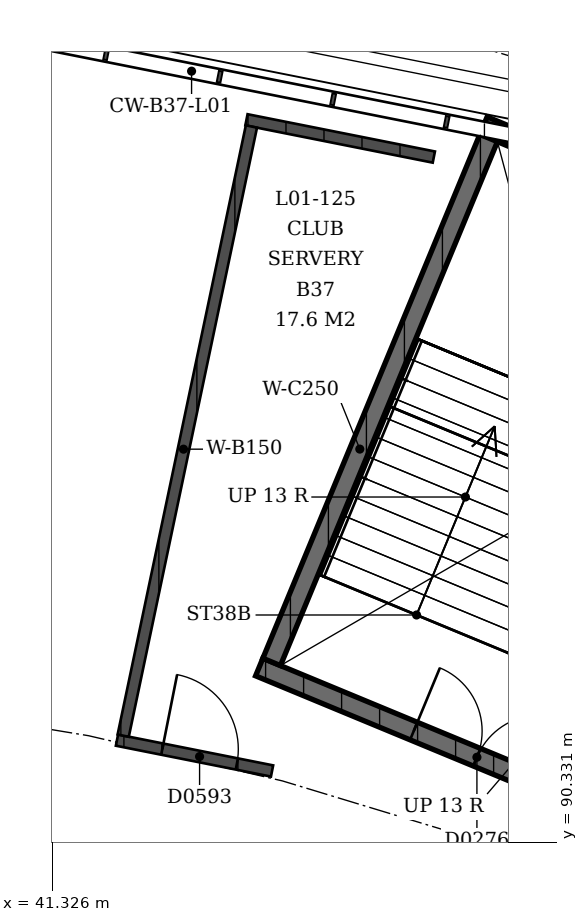
"""IFC4 building model, lengths in metres.
Left out: names, types, materials, properties, quantities, classifications, styles, units other than length and angle.
Written with IfcOpenShell. Run it as: python <this file> out.ifc"""

import sys

from ifc_helpers import new_model, si_unit, direction, frame, frame_2d, origin, place, context, subcontext, project, spatial, rectangle, extrude, element, fill, save


model = new_model("IFC4")
c1 = context("Model", 3, precision=1e-05, world=origin(), true_north=direction((0.0, 1.0)))
c2 = subcontext(c1, "Body", "Model", "MODEL_VIEW")
j1 = project(units=[si_unit("LENGTHUNIT", "METRE"), si_unit("PLANEANGLEUNIT", "RADIAN")], contexts=[c1])
p1 = place(None, origin())
s1 = spatial("IfcSite", under=j1, at=p1, CompositionType="ELEMENT")
p2 = place(p1, origin())
s2 = spatial("IfcBuilding", under=s1, at=p2, CompositionType="ELEMENT")
p3 = place(p2, frame((0.0, 0.0, 4.5)))
s3 = spatial("IfcBuildingStorey", under=s2, at=p3, CompositionType="ELEMENT", Elevation=4.5)
p4 = place(p3, frame((55.274, 87.985, 0.0), z_axis=(0.0, 0.0, 1.0), x_axis=(-0.923877480578, 0.382688386133, 0.0)))
e1 = element("IfcWall", 1, at=p4, inside=s3, PredefinedType="SHEAR", context=c2, shape_type="SweptSolid", body=[
    extrude(rectangle(XDim=12.15, YDim=0.25, at=frame_2d((6.075, 0.0))), origin(), (0.0, 0.0, 1.0), 4.09),
])
p5 = place(p4, frame((2.2, 0.0, 0.0)))
e2 = element("IfcOpeningElement", 2, at=p5, cuts=e1, PredefinedType="OPENING", context=c2, shape_type="SweptSolid", body=[
    extrude(rectangle(XDim=1.8, YDim=2.1, at=frame_2d((0.9, 1.05))), frame((0.0, 0.125, 0.0), z_axis=(0.0, -1.0, 0.0), x_axis=(1.0, 0.0, 0.0)), (0.0, 0.0, 1.0), 0.25),
])
p6 = place(p4, frame((8.15, 0.0, 0.0)))
e3 = element("IfcOpeningElement", 3, at=p6, cuts=e1, PredefinedType="OPENING", context=c2, shape_type="SweptSolid", body=[
    extrude(rectangle(XDim=1.8, YDim=2.1, at=frame_2d((0.9, 1.05))), frame((0.0, 0.125, 0.0), z_axis=(0.0, -1.0, 0.0), x_axis=(1.0, 0.0, 0.0)), (0.0, 0.0, 1.0), 0.25),
])
p7 = place(p3, frame((58.224, 95.108, 0.0), z_axis=(0.0, 0.0, 1.0), x_axis=(-0.923884584817, 0.382671234792, 0.0)))
e4 = element("IfcWall", 4, at=p7, inside=s3, PredefinedType="SHEAR", context=c2, shape_type="SweptSolid", body=[
    extrude(rectangle(XDim=12.15, YDim=0.25, at=frame_2d((6.075, 0.0))), origin(), (0.0, 0.0, 1.0), 4.09),
])
p8 = place(p3, frame((44.212, 92.702, 0.0), z_axis=(0.0, 0.0, 1.0), x_axis=(0.382664910245, 0.923887204407, 0.0)))
e5 = element("IfcWall", 5, at=p8, inside=s3, PredefinedType="SHEAR", context=c2, shape_type="SweptSolid", body=[
    extrude(rectangle(XDim=7.46, YDim=0.25, at=frame_2d((3.73, 0.0))), origin(), (0.0, 0.0, 1.0), 4.09),
])
p9 = place(p3, frame((44.217, 91.268, 0.0), z_axis=(0.0, 0.0, 1.0), x_axis=(-0.980769797582, 0.195168143279, 0.0)))
e6 = element("IfcWall", 6, at=p9, inside=s3, PredefinedType="SOLIDWALL", context=c2, shape_type="SweptSolid", body=[
    extrude(rectangle(XDim=2.08, YDim=0.15, at=frame_2d((1.04, 0.0))), origin(), (0.0, 0.0, 1.0), 3.0),
])
p10 = place(p9, frame((0.472, 0.0, 0.0)))
e7 = element("IfcOpeningElement", 7, at=p10, cuts=e6, PredefinedType="OPENING", context=c2, shape_type="SweptSolid", body=[
    extrude(rectangle(XDim=1.0, YDim=2.1, at=frame_2d((0.5, 1.05))), frame((0.0, 0.075, 0.0), z_axis=(0.0, -1.0, 0.0), x_axis=(1.0, 0.0, 0.0)), (0.0, 0.0, 1.0), 0.15),
])
p11 = place(p3, frame((46.346, 99.344, 0.0), z_axis=(0.0, 0.0, 1.0), x_axis=(-0.980778163577, 0.195126097309, 0.0)))
e8 = element("IfcWall", 8, at=p11, inside=s3, PredefinedType="SOLIDWALL", context=c2, shape_type="SweptSolid", body=[
    extrude(rectangle(XDim=2.514, YDim=0.15, at=frame_2d((1.257, 0.0))), origin(), (0.0, 0.0, 1.0), 3.0),
])
p12 = place(p3, frame((42.259, 91.732, 0.0), z_axis=(0.0, 0.0, 1.0), x_axis=(0.206011983374, 0.978549468707, 0.0)))
e9 = element("IfcWall", 9, at=p12, inside=s3, PredefinedType="SOLIDWALL", context=c2, shape_type="SweptSolid", body=[
    extrude(rectangle(XDim=8.19, YDim=0.15, at=frame_2d((4.095, 0.0))), origin(), (0.0, 0.0, 1.0), 3.0),
])
p13 = place(p6, origin())
e10 = element("IfcDoor", 10, at=p13, inside=s3, OperationType="DOUBLE_DOOR_SINGLE_SWING", PredefinedType="DOOR", context=c2, shape_type="SweptSolid", body=[
    extrude(rectangle(XDim=1.8, YDim=2.1, at=frame_2d((0.9, 1.05))), frame((0.0, 0.025, 0.0), z_axis=(0.0, -1.0, 0.0), x_axis=(1.0, 0.0, 0.0)), (0.0, 0.0, 1.0), 0.05),
])
fill(e3, e10)
p14 = place(p10, origin())
e11 = element("IfcDoor", 11, at=p14, inside=s3, OperationType="SINGLE_SWING_RIGHT", PredefinedType="DOOR", context=c2, shape_type="SweptSolid", body=[
    extrude(rectangle(XDim=1.0, YDim=2.1, at=frame_2d((0.5, 1.05))), frame((0.0, 0.025, 0.0), z_axis=(0.0, -1.0, 0.0), x_axis=(1.0, 0.0, 0.0)), (0.0, 0.0, 1.0), 0.05),
])
fill(e7, e11)
save(model, sys.argv[1])
